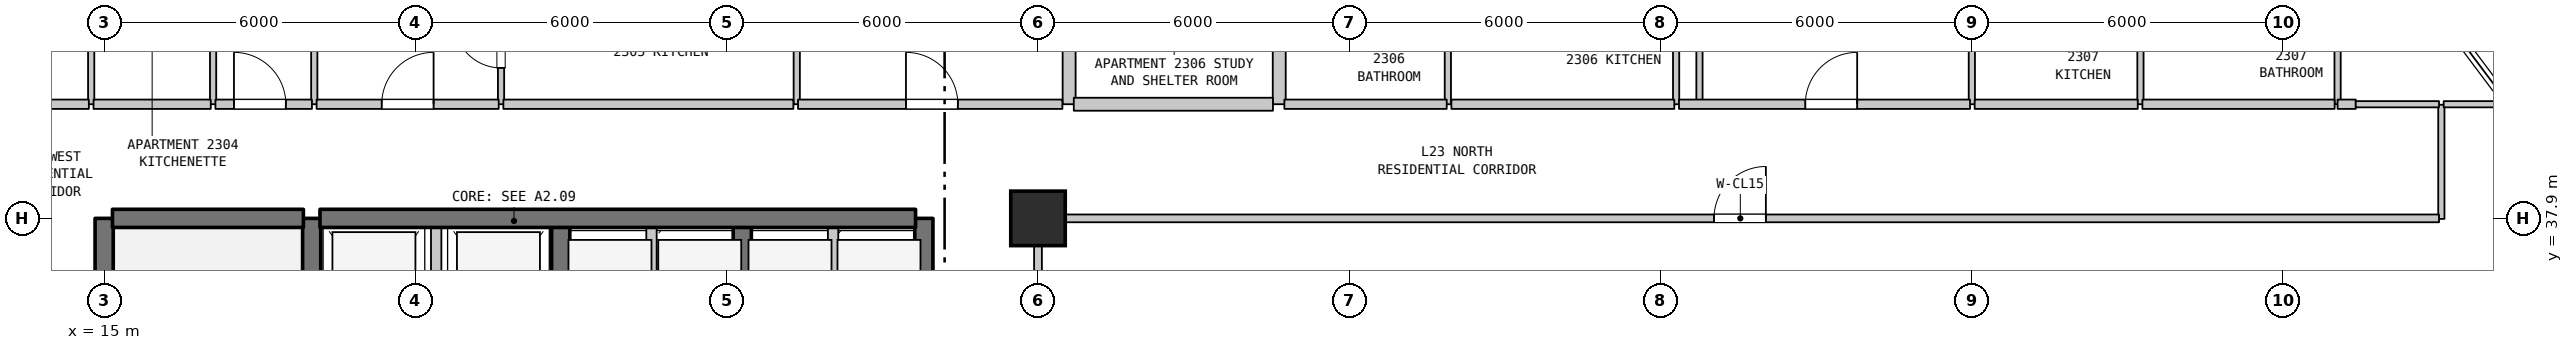
"""IFC4 building model, lengths in metres.
Left out: names, types, materials, properties, quantities, classifications, styles, units other than length and angle.
Written with IfcOpenShell. Run it as: python <this file> out.ifc"""

import sys

from ifc_helpers import new_model, si_unit, direction, frame, frame_2d, origin, origin_2d, place, context, subcontext, project, spatial, rectangle, extrude, element, fill, save


model = new_model("IFC4")
c1 = context("Model", 3, precision=1e-05, world=origin(), true_north=direction((0.0, 1.0)))
c2 = subcontext(c1, "Body", "Model", "MODEL_VIEW")
j1 = project(units=[si_unit("LENGTHUNIT", "METRE"), si_unit("PLANEANGLEUNIT", "RADIAN")], contexts=[c1])
p1 = place(None, origin())
s1 = spatial("IfcSite", under=j1, at=p1, CompositionType="ELEMENT")
p2 = place(p1, origin())
s2 = spatial("IfcBuilding", under=s1, at=p2, CompositionType="ELEMENT")
p3 = place(p2, frame((0.0, 0.0, 98.3)))
s3 = spatial("IfcBuildingStorey", under=s2, at=p3, CompositionType="ELEMENT", Elevation=98.3)
p4 = place(p3, frame((33.0, 37.9, 0.0), z_axis=(0.0, 0.0, 1.0), x_axis=(1.0, 0.0, 0.0)))
e1 = element("IfcColumn", 1, at=p4, inside=s3, PredefinedType="COLUMN", context=c2, shape_type="SweptSolid", body=[
    extrude(rectangle(XDim=1.05, YDim=1.05, at=origin_2d()), origin(), (0.0, 0.0, 1.0), 3.7),
])
p5 = place(p3, frame((14.75, 40.1, 0.0), z_axis=(0.0, 0.0, 1.0), x_axis=(0.0, 1.0, 0.0)))
e2 = element("IfcWall", 2, at=p5, inside=s3, PredefinedType="PARTITIONING", context=c2, shape_type="SweptSolid", body=[
    extrude(rectangle(XDim=3.2, YDim=0.12, at=frame_2d((1.6, 0.0))), origin(), (0.0, 0.0, 1.0), 3.385),
])
p6 = place(p5, frame((1.15, 0.0, 0.0)))
e3 = element("IfcOpeningElement", 3, at=p6, cuts=e2, PredefinedType="OPENING", context=c2, shape_type="SweptSolid", body=[
    extrude(rectangle(XDim=0.9, YDim=2.15, at=frame_2d((0.45, 1.075))), frame((0.0, 0.07, 0.0), z_axis=(0.0, -1.0, 0.0), x_axis=(1.0, 0.0, 0.0)), (0.0, 0.0, 1.0), 0.14),
])
p7 = place(p3, frame((15.0, 31.1, 0.0), z_axis=(0.0, 0.0, 1.0), x_axis=(0.0, 1.0, 0.0)))
e4 = element("IfcWall", 4, at=p7, inside=s3, PredefinedType="SHEAR", context=c2, shape_type="SweptSolid", body=[
    extrude(rectangle(XDim=6.8, YDim=0.35, at=frame_2d((3.4, 0.0))), origin(), (0.0, 0.0, 1.0), 3.385),
])
p8 = place(p3, frame((17.1, 40.1, 0.0), z_axis=(0.0, 0.0, 1.0), x_axis=(0.0, 1.0, 0.0)))
e5 = element("IfcWall", 5, at=p8, inside=s3, PredefinedType="PARTITIONING", context=c2, shape_type="SweptSolid", body=[
    extrude(rectangle(XDim=3.2, YDim=0.12, at=frame_2d((1.6, 0.0))), origin(), (0.0, 0.0, 1.0), 3.385),
])
p9 = place(p3, frame((19.0, 35.0, 0.0), z_axis=(0.0, 0.0, 1.0), x_axis=(0.0, 1.0, 0.0)))
e6 = element("IfcWall", 6, at=p9, inside=s3, PredefinedType="SHEAR", context=c2, shape_type="SweptSolid", body=[
    extrude(rectangle(XDim=2.9, YDim=0.35, at=frame_2d((1.45, 0.0))), origin(), (0.0, 0.0, 1.0), 3.385),
])
p10 = place(p3, frame((19.05, 40.1, 0.0), z_axis=(0.0, 0.0, 1.0), x_axis=(0.0, 1.0, 0.0)))
e7 = element("IfcWall", 7, at=p10, inside=s3, PredefinedType="PARTITIONING", context=c2, shape_type="SweptSolid", body=[
    extrude(rectangle(XDim=13.79, YDim=0.12, at=frame_2d((6.895, 0.0))), origin(), (0.0, 0.0, 1.0), 3.385),
])
p11 = place(p3, frame((21.4, 35.0, 0.0), z_axis=(0.0, 0.0, 1.0), x_axis=(0.0, 1.0, 0.0)))
e8 = element("IfcWall", 8, at=p11, inside=s3, PredefinedType="STANDARD", context=c2, shape_type="SweptSolid", body=[
    extrude(rectangle(XDim=2.9, YDim=0.2, at=frame_2d((1.45, 0.0))), origin(), (0.0, 0.0, 1.0), 3.385),
])
p12 = place(p3, frame((22.65, 40.1, 0.0), z_axis=(0.0, 0.0, 1.0), x_axis=(0.0, 1.0, 0.0)))
e9 = element("IfcWall", 9, at=p12, inside=s3, PredefinedType="PARTITIONING", context=c2, shape_type="SweptSolid", body=[
    extrude(rectangle(XDim=2.3, YDim=0.12, at=frame_2d((1.15, 0.0))), origin(), (0.0, 0.0, 1.0), 3.385),
])
p13 = place(p12, frame((0.7, 0.0, 0.0)))
e10 = element("IfcOpeningElement", 10, at=p13, cuts=e9, PredefinedType="OPENING", context=c2, shape_type="SweptSolid", body=[
    extrude(rectangle(XDim=0.9, YDim=2.15, at=frame_2d((0.45, 1.075))), frame((0.0, 0.07, 0.0), z_axis=(0.0, -1.0, 0.0), x_axis=(1.0, 0.0, 0.0)), (0.0, 0.0, 1.0), 0.14),
])
p14 = place(p3, frame((23.8, 35.0, 0.0), z_axis=(0.0, 0.0, 1.0), x_axis=(0.0, 1.0, 0.0)))
e11 = element("IfcWall", 11, at=p14, inside=s3, PredefinedType="SHEAR", context=c2, shape_type="SweptSolid", body=[
    extrude(rectangle(XDim=2.9, YDim=0.35, at=frame_2d((1.45, 0.0))), origin(), (0.0, 0.0, 1.0), 3.385),
])
p15 = place(p3, frame((25.55, 35.0, 0.0), z_axis=(0.0, 0.0, 1.0), x_axis=(0.0, 1.0, 0.0)))
e12 = element("IfcWall", 12, at=p15, inside=s3, PredefinedType="STANDARD", context=c2, shape_type="SweptSolid", body=[
    extrude(rectangle(XDim=2.9, YDim=0.2, at=frame_2d((1.45, 0.0))), origin(), (0.0, 0.0, 1.0), 3.385),
])
p16 = place(p3, frame((27.3, 35.0, 0.0), z_axis=(0.0, 0.0, 1.0), x_axis=(0.0, 1.0, 0.0)))
e13 = element("IfcWall", 13, at=p16, inside=s3, PredefinedType="SHEAR", context=c2, shape_type="SweptSolid", body=[
    extrude(rectangle(XDim=2.9, YDim=0.35, at=frame_2d((1.45, 0.0))), origin(), (0.0, 0.0, 1.0), 3.385),
])
p17 = place(p3, frame((28.35, 40.1, 0.0), z_axis=(0.0, 0.0, 1.0), x_axis=(0.0, 1.0, 0.0)))
e14 = element("IfcWall", 14, at=p17, inside=s3, PredefinedType="PARTITIONING", context=c2, shape_type="SweptSolid", body=[
    extrude(rectangle(XDim=2.05, YDim=0.12, at=frame_2d((1.025, 0.0))), origin(), (0.0, 0.0, 1.0), 3.385),
])
p18 = place(p3, frame((29.05, 35.0, 0.0), z_axis=(0.0, 0.0, 1.0), x_axis=(0.0, 1.0, 0.0)))
e15 = element("IfcWall", 15, at=p18, inside=s3, PredefinedType="STANDARD", context=c2, shape_type="SweptSolid", body=[
    extrude(rectangle(XDim=2.9, YDim=0.2, at=frame_2d((1.45, 0.0))), origin(), (0.0, 0.0, 1.0), 3.385),
])
p19 = place(p3, frame((30.8, 35.0, 0.0), z_axis=(0.0, 0.0, 1.0), x_axis=(0.0, 1.0, 0.0)))
e16 = element("IfcWall", 16, at=p19, inside=s3, PredefinedType="SHEAR", context=c2, shape_type="SweptSolid", body=[
    extrude(rectangle(XDim=2.9, YDim=0.35, at=frame_2d((1.45, 0.0))), origin(), (0.0, 0.0, 1.0), 3.385),
])
p20 = place(p3, frame((33.0, 27.91, 0.0), z_axis=(0.0, 0.0, 1.0), x_axis=(0.0, 1.0, 0.0)))
e17 = element("IfcWall", 17, at=p20, inside=s3, PredefinedType="STANDARD", context=c2, shape_type="SweptSolid", body=[
    extrude(rectangle(XDim=9.98, YDim=0.15, at=frame_2d((4.99, 0.0))), origin(), (0.0, 0.0, 1.0), 2.885),
])
for number, where, z_axis, x_axis in (
    (18, (33.6, 40.1, 0.0), (0.0, 0.0, 1.0), (0.0, 1.0, 0.0)),
    (19, (37.65, 40.1, 0.0), (0.0, 0.0, 1.0), (0.0, 1.0, 0.0)),
):
    element("IfcWall", number, at=place(p3, frame(where, z_axis=z_axis, x_axis=x_axis)), inside=s3, PredefinedType="STANDARD", context=c2, shape_type="SweptSolid", body=[
        extrude(rectangle(XDim=2.3, YDim=0.25, at=frame_2d((1.15, 0.0))), origin(), (0.0, 0.0, 1.0), 3.385),
    ])
for number, where, z_axis, x_axis in (
    (20, (40.9, 40.1, 0.0), (0.0, 0.0, 1.0), (0.0, 1.0, 0.0)),
    (21, (45.3, 40.1, 0.0), (0.0, 0.0, 1.0), (0.0, 1.0, 0.0)),
):
    element("IfcWall", number, at=place(p3, frame(where, z_axis=z_axis, x_axis=x_axis)), inside=s3, PredefinedType="PARTITIONING", context=c2, shape_type="SweptSolid", body=[
        extrude(rectangle(XDim=2.3, YDim=0.12, at=frame_2d((1.15, 0.0))), origin(), (0.0, 0.0, 1.0), 3.385),
    ])
p21 = place(p3, frame((45.75, 40.1, 0.0), z_axis=(0.0, 0.0, 1.0), x_axis=(0.0, 1.0, 0.0)))
e22 = element("IfcWall", 22, at=p21, inside=s3, PredefinedType="PARTITIONING", context=c2, shape_type="SweptSolid", body=[
    extrude(rectangle(XDim=2.05, YDim=0.12, at=frame_2d((1.025, 0.0))), origin(), (0.0, 0.0, 1.0), 3.385),
])
for number, where, z_axis, x_axis in (
    (23, (51.0, 40.1, 0.0), (0.0, 0.0, 1.0), (0.0, 1.0, 0.0)),
    (24, (54.25, 40.1, 0.0), (0.0, 0.0, 1.0), (0.0, 1.0, 0.0)),
    (25, (58.05, 40.1, 0.0), (0.0, 0.0, 1.0), (0.0, 1.0, 0.0)),
):
    element("IfcWall", number, at=place(p3, frame(where, z_axis=z_axis, x_axis=x_axis)), inside=s3, PredefinedType="PARTITIONING", context=c2, shape_type="SweptSolid", body=[
        extrude(rectangle(XDim=2.3, YDim=0.12, at=frame_2d((1.15, 0.0))), origin(), (0.0, 0.0, 1.0), 3.385),
    ])
p22 = place(p3, frame((60.05, 37.89, 0.0), z_axis=(0.0, 0.0, 1.0), x_axis=(0.0, 1.0, 0.0)))
e26 = element("IfcWall", 26, at=p22, inside=s3, PredefinedType="PARTITIONING", context=c2, shape_type="SweptSolid", body=[
    extrude(rectangle(XDim=2.2, YDim=0.12, at=frame_2d((1.1, 0.0))), origin(), (0.0, 0.0, 1.0), 3.385),
])
p23 = place(p3, frame((15.16, 37.9, 0.0), z_axis=(0.0, 0.0, 1.0), x_axis=(1.0, 0.0, 0.0)))
e27 = element("IfcWall", 27, at=p23, inside=s3, PredefinedType="SHEAR", context=c2, shape_type="SweptSolid", body=[
    extrude(rectangle(XDim=3.68, YDim=0.35, at=frame_2d((1.84, 0.0))), origin(), (0.0, 0.0, 1.0), 3.385),
])
p24 = place(p3, frame((19.16, 37.9, 0.0), z_axis=(0.0, 0.0, 1.0), x_axis=(1.0, 0.0, 0.0)))
e28 = element("IfcWall", 28, at=p24, inside=s3, PredefinedType="SHEAR", context=c2, shape_type="SweptSolid", body=[
    extrude(rectangle(XDim=11.48, YDim=0.35, at=frame_2d((5.74, 0.0))), origin(), (0.0, 0.0, 1.0), 3.385),
])
p25 = place(p3, frame((33.07, 37.9, 0.0), z_axis=(0.0, 0.0, 1.0), x_axis=(1.0, 0.0, 0.0)))
e29 = element("IfcWall", 29, at=p25, inside=s3, PredefinedType="STANDARD", context=c2, shape_type="SweptSolid", body=[
    extrude(rectangle(XDim=26.935, YDim=0.15, at=frame_2d((13.467, 0.0))), origin(), (0.0, 0.0, 1.0), 3.385),
])
p26 = place(p25, frame((12.96, 0.0, 0.0)))
e30 = element("IfcOpeningElement", 30, at=p26, cuts=e29, PredefinedType="OPENING", context=c2, shape_type="SweptSolid", body=[
    extrude(rectangle(XDim=1.0, YDim=2.15, at=frame_2d((0.5, 1.075))), frame((0.0, 0.085, 0.0), z_axis=(0.0, -1.0, 0.0), x_axis=(1.0, 0.0, 0.0)), (0.0, 0.0, 1.0), 0.17),
])
p27 = place(p3, frame((12.875, 40.1, 0.0), z_axis=(0.0, 0.0, 1.0), x_axis=(1.0, 0.0, 0.0)))
e31 = element("IfcWall", 31, at=p27, inside=s3, PredefinedType="STANDARD", context=c2, shape_type="SweptSolid", body=[
    extrude(rectangle(XDim=1.83, YDim=0.18, at=frame_2d((0.915, 0.0))), origin(), (0.0, 0.0, 1.0), 3.385),
])
p28 = place(p3, frame((14.795, 40.1, 0.0), z_axis=(0.0, 0.0, 1.0), x_axis=(1.0, 0.0, 0.0)))
e32 = element("IfcWall", 32, at=p28, inside=s3, PredefinedType="STANDARD", context=c2, shape_type="SweptSolid", body=[
    extrude(rectangle(XDim=2.26, YDim=0.18, at=frame_2d((1.13, 0.0))), origin(), (0.0, 0.0, 1.0), 3.385),
])
p29 = place(p3, frame((17.145, 40.1, 0.0), z_axis=(0.0, 0.0, 1.0), x_axis=(1.0, 0.0, 0.0)))
e33 = element("IfcWall", 33, at=p29, inside=s3, PredefinedType="STANDARD", context=c2, shape_type="SweptSolid", body=[
    extrude(rectangle(XDim=1.86, YDim=0.18, at=frame_2d((0.93, 0.0))), origin(), (0.0, 0.0, 1.0), 3.385),
])
p30 = place(p29, frame((0.357, 0.0, 0.0)))
e34 = element("IfcOpeningElement", 34, at=p30, cuts=e33, PredefinedType="OPENING", context=c2, shape_type="SweptSolid", body=[
    extrude(rectangle(XDim=1.0, YDim=2.15, at=frame_2d((0.5, 1.075))), frame((0.0, 0.1, 0.0), z_axis=(0.0, -1.0, 0.0), x_axis=(1.0, 0.0, 0.0)), (0.0, 0.0, 1.0), 0.2),
])
p31 = place(p3, frame((19.095, 40.1, 0.0), z_axis=(0.0, 0.0, 1.0), x_axis=(1.0, 0.0, 0.0)))
e35 = element("IfcWall", 35, at=p31, inside=s3, PredefinedType="STANDARD", context=c2, shape_type="SweptSolid", body=[
    extrude(rectangle(XDim=3.51, YDim=0.18, at=frame_2d((1.755, 0.0))), origin(), (0.0, 0.0, 1.0), 3.385),
])
p32 = place(p31, frame((1.255, 0.0, 0.0)))
e36 = element("IfcOpeningElement", 36, at=p32, cuts=e35, PredefinedType="OPENING", context=c2, shape_type="SweptSolid", body=[
    extrude(rectangle(XDim=1.0, YDim=2.15, at=frame_2d((0.5, 1.075))), frame((0.0, 0.1, 0.0), z_axis=(0.0, -1.0, 0.0), x_axis=(1.0, 0.0, 0.0)), (0.0, 0.0, 1.0), 0.2),
])
p33 = place(p3, frame((22.695, 40.1, 0.0), z_axis=(0.0, 0.0, 1.0), x_axis=(1.0, 0.0, 0.0)))
e37 = element("IfcWall", 37, at=p33, inside=s3, PredefinedType="STANDARD", context=c2, shape_type="SweptSolid", body=[
    extrude(rectangle(XDim=5.59, YDim=0.18, at=frame_2d((2.795, 0.0))), origin(), (0.0, 0.0, 1.0), 3.385),
])
p34 = place(p3, frame((28.375, 40.1, 0.0), z_axis=(0.0, 0.0, 1.0), x_axis=(1.0, 0.0, 0.0)))
e38 = element("IfcWall", 38, at=p34, inside=s3, PredefinedType="STANDARD", context=c2, shape_type="SweptSolid", body=[
    extrude(rectangle(XDim=5.095, YDim=0.18, at=frame_2d((2.547, 0.0))), origin(), (0.0, 0.0, 1.0), 3.385),
])
p35 = place(p34, frame((2.08, 0.0, 0.0)))
e39 = element("IfcOpeningElement", 39, at=p35, cuts=e38, PredefinedType="OPENING", context=c2, shape_type="SweptSolid", body=[
    extrude(rectangle(XDim=1.0, YDim=2.15, at=frame_2d((0.5, 1.075))), frame((0.0, 0.1, 0.0), z_axis=(0.0, -1.0, 0.0), x_axis=(1.0, 0.0, 0.0)), (0.0, 0.0, 1.0), 0.2),
])
p36 = place(p3, frame((33.69, 40.1, 0.0), z_axis=(0.0, 0.0, 1.0), x_axis=(1.0, 0.0, 0.0)))
e40 = element("IfcWall", 40, at=p36, inside=s3, PredefinedType="STANDARD", context=c2, shape_type="SweptSolid", body=[
    extrude(rectangle(XDim=3.839, YDim=0.25, at=frame_2d((1.919, 0.0))), origin(), (0.0, 0.0, 1.0), 3.385),
])
p37 = place(p3, frame((37.749, 40.1, 0.0), z_axis=(0.0, 0.0, 1.0), x_axis=(1.0, 0.0, 0.0)))
e41 = element("IfcWall", 41, at=p37, inside=s3, PredefinedType="STANDARD", context=c2, shape_type="SweptSolid", body=[
    extrude(rectangle(XDim=3.129, YDim=0.18, at=frame_2d((1.564, 0.0))), origin(), (0.0, 0.0, 1.0), 3.385),
])
p38 = place(p3, frame((40.968, 40.1, 0.0), z_axis=(0.0, 0.0, 1.0), x_axis=(1.0, 0.0, 0.0)))
e42 = element("IfcWall", 42, at=p38, inside=s3, PredefinedType="STANDARD", context=c2, shape_type="SweptSolid", body=[
    extrude(rectangle(XDim=4.297, YDim=0.18, at=frame_2d((2.148, 0.0))), origin(), (0.0, 0.0, 1.0), 3.385),
])
p39 = place(p3, frame((45.355, 40.1, 0.0), z_axis=(0.0, 0.0, 1.0), x_axis=(1.0, 0.0, 0.0)))
e43 = element("IfcWall", 43, at=p39, inside=s3, PredefinedType="STANDARD", context=c2, shape_type="SweptSolid", body=[
    extrude(rectangle(XDim=5.61, YDim=0.18, at=frame_2d((2.805, 0.0))), origin(), (0.0, 0.0, 1.0), 3.385),
])
p40 = place(p39, frame((2.435, 0.0, 0.0)))
e44 = element("IfcOpeningElement", 44, at=p40, cuts=e43, PredefinedType="OPENING", context=c2, shape_type="SweptSolid", body=[
    extrude(rectangle(XDim=1.0, YDim=2.15, at=frame_2d((0.5, 1.075))), frame((0.0, 0.1, 0.0), z_axis=(0.0, -1.0, 0.0), x_axis=(1.0, 0.0, 0.0)), (0.0, 0.0, 1.0), 0.2),
])
p41 = place(p3, frame((51.055, 40.1, 0.0), z_axis=(0.0, 0.0, 1.0), x_axis=(1.0, 0.0, 0.0)))
e45 = element("IfcWall", 45, at=p41, inside=s3, PredefinedType="STANDARD", context=c2, shape_type="SweptSolid", body=[
    extrude(rectangle(XDim=3.143, YDim=0.18, at=frame_2d((1.572, 0.0))), origin(), (0.0, 0.0, 1.0), 3.385),
])
p42 = place(p3, frame((54.288, 40.1, 0.0), z_axis=(0.0, 0.0, 1.0), x_axis=(1.0, 0.0, 0.0)))
e46 = element("IfcWall", 46, at=p42, inside=s3, PredefinedType="STANDARD", context=c2, shape_type="SweptSolid", body=[
    extrude(rectangle(XDim=3.705, YDim=0.18, at=frame_2d((1.853, 0.0))), origin(), (0.0, 0.0, 1.0), 3.385),
])
p43 = place(p3, frame((58.05, 40.1, 0.0), z_axis=(0.0, 0.0, 1.0), x_axis=(1.0, 0.0, 0.0)))
e47 = element("IfcWall", 47, at=p43, inside=s3, PredefinedType="STANDARD", context=c2, shape_type="SweptSolid", body=[
    extrude(rectangle(XDim=0.35, YDim=0.18, at=frame_2d((0.175, 0.0))), origin(), (0.0, 0.0, 1.0), 3.385),
])
p44 = place(p3, frame((58.4, 40.1, 0.0), z_axis=(0.0, 0.0, 1.0), x_axis=(1.0, 0.0, 0.0)))
e48 = element("IfcWall", 48, at=p44, inside=s3, PredefinedType="PARTITIONING", context=c2, shape_type="SweptSolid", body=[
    extrude(rectangle(XDim=1.605, YDim=0.12, at=frame_2d((0.802, 0.0))), origin(), (0.0, 0.0, 1.0), 3.385),
])
p45 = place(p3, frame((60.095, 40.1, 0.0), z_axis=(0.0, 0.0, 1.0), x_axis=(1.0, 0.0, 0.0)))
e49 = element("IfcWall", 49, at=p45, inside=s3, PredefinedType="PARTITIONING", context=c2, shape_type="SweptSolid", body=[
    extrude(rectangle(XDim=1.245, YDim=0.12, at=frame_2d((0.623, 0.0))), origin(), (0.0, 0.0, 1.0), 3.385),
])
p46 = place(p13, origin())
e50 = element("IfcDoor", 50, at=p46, inside=s3, OperationType="SINGLE_SWING_RIGHT", PredefinedType="DOOR", context=c2, shape_type="SweptSolid", body=[
    extrude(rectangle(XDim=0.9, YDim=2.15, at=frame_2d((0.45, 1.075))), frame((0.0, 0.025, 0.0), z_axis=(0.0, -1.0, 0.0), x_axis=(1.0, 0.0, 0.0)), (0.0, 0.0, 1.0), 0.05),
])
fill(e10, e50)
p47 = place(p26, origin())
e51 = element("IfcDoor", 51, at=p47, inside=s3, OperationType="SINGLE_SWING_RIGHT", PredefinedType="DOOR", context=c2, shape_type="SweptSolid", body=[
    extrude(rectangle(XDim=1.0, YDim=2.15, at=frame_2d((0.5, 1.075))), frame((0.0, 0.025, 0.0), z_axis=(0.0, -1.0, 0.0), x_axis=(1.0, 0.0, 0.0)), (0.0, 0.0, 1.0), 0.05),
])
fill(e30, e51)
p48 = place(p30, origin())
e52 = element("IfcDoor", 52, at=p48, inside=s3, OperationType="SINGLE_SWING_LEFT", PredefinedType="DOOR", context=c2, shape_type="SweptSolid", body=[
    extrude(rectangle(XDim=1.0, YDim=2.15, at=frame_2d((0.5, 1.075))), frame((0.0, 0.025, 0.0), z_axis=(0.0, -1.0, 0.0), x_axis=(1.0, 0.0, 0.0)), (0.0, 0.0, 1.0), 0.05),
])
fill(e34, e52)
p49 = place(p32, origin())
e53 = element("IfcDoor", 53, at=p49, inside=s3, OperationType="SINGLE_SWING_RIGHT", PredefinedType="DOOR", context=c2, shape_type="SweptSolid", body=[
    extrude(rectangle(XDim=1.0, YDim=2.15, at=frame_2d((0.5, 1.075))), frame((0.0, 0.025, 0.0), z_axis=(0.0, -1.0, 0.0), x_axis=(1.0, 0.0, 0.0)), (0.0, 0.0, 1.0), 0.05),
])
fill(e36, e53)
p50 = place(p35, origin())
e54 = element("IfcDoor", 54, at=p50, inside=s3, OperationType="SINGLE_SWING_LEFT", PredefinedType="DOOR", context=c2, shape_type="SweptSolid", body=[
    extrude(rectangle(XDim=1.0, YDim=2.15, at=frame_2d((0.5, 1.075))), frame((0.0, 0.025, 0.0), z_axis=(0.0, -1.0, 0.0), x_axis=(1.0, 0.0, 0.0)), (0.0, 0.0, 1.0), 0.05),
])
fill(e39, e54)
p51 = place(p40, origin())
e55 = element("IfcDoor", 55, at=p51, inside=s3, OperationType="SINGLE_SWING_RIGHT", PredefinedType="DOOR", context=c2, shape_type="SweptSolid", body=[
    extrude(rectangle(XDim=1.0, YDim=2.15, at=frame_2d((0.5, 1.075))), frame((0.0, 0.025, 0.0), z_axis=(0.0, -1.0, 0.0), x_axis=(1.0, 0.0, 0.0)), (0.0, 0.0, 1.0), 0.05),
])
fill(e44, e55)
save(model, sys.argv[1])
